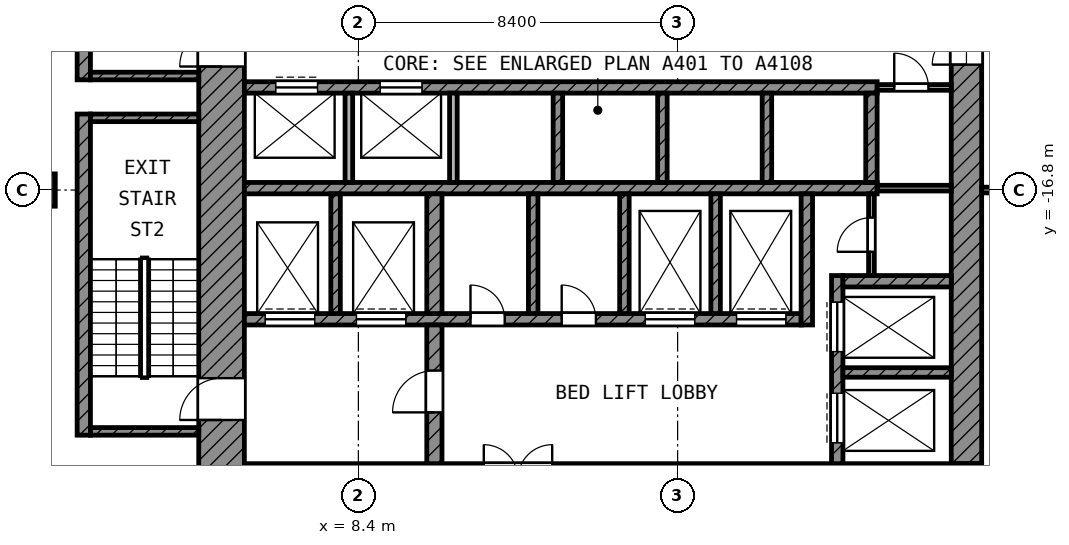
"""IFC4 building model, lengths in metres.
Left out: names, types, materials, properties, quantities, classifications, styles, units other than length and angle.
Written with IfcOpenShell. Run it as: python <this file> out.ifc"""

import sys

from ifc_helpers import new_model, si_unit, direction, frame, frame_2d, origin, origin_2d, place, context, subcontext, project, spatial, rectangle, extrude, element, fill, save


model = new_model("IFC4")
c1 = context("Model", 3, precision=1e-05, world=origin(), true_north=direction((0.0, 1.0)))
c2 = subcontext(c1, "Body", "Model", "MODEL_VIEW")
j1 = project(units=[si_unit("LENGTHUNIT", "METRE"), si_unit("PLANEANGLEUNIT", "RADIAN")], contexts=[c1])
p1 = place(None, origin())
s1 = spatial("IfcSite", under=j1, at=p1, CompositionType="ELEMENT")
p2 = place(p1, origin())
s2 = spatial("IfcBuilding", under=s1, at=p2, CompositionType="ELEMENT")
p3 = place(p2, frame((0.0, 0.0, 218.0)))
s3 = spatial("IfcBuildingStorey", under=s2, at=p3, CompositionType="ELEMENT", Elevation=218.0)
p4 = place(p3, frame((0.0, -16.8, 0.0), z_axis=(0.0, 0.0, 1.0), x_axis=(1.0, 0.0, 0.0)))
e1 = element("IfcColumn", 1, at=p4, inside=s3, PredefinedType="COLUMN", context=c2, shape_type="SweptSolid", body=[
    extrude(rectangle(XDim=0.85, YDim=0.85, at=origin_2d()), origin(), (0.0, 0.0, 1.0), 4.2),
])
p5 = place(p3, frame((4.8, -24.8, 0.0), z_axis=(0.0, 0.0, 1.0), x_axis=(0.0, 1.0, 0.0)))
e2 = element("IfcWall", 2, at=p5, inside=s3, PredefinedType="SHEAR", context=c2, shape_type="SweptSolid", body=[
    extrude(rectangle(XDim=19.4, YDim=1.2, at=frame_2d((9.7, 0.0))), origin(), (0.0, 0.0, 1.0), 3.6),
])
p6 = place(p5, frame((11.25, 0.0, 0.0)))
e3 = element("IfcOpeningElement", 3, at=p6, cuts=e2, PredefinedType="OPENING", context=c2, shape_type="SweptSolid", body=[
    extrude(rectangle(XDim=1.1, YDim=2.1, at=frame_2d((0.55, 1.05))), frame((0.0, 0.61, 0.0), z_axis=(0.0, -1.0, 0.0), x_axis=(1.0, 0.0, 0.0)), (0.0, 0.0, 1.0), 1.22),
])
p7 = place(p5, frame((1.95, 0.0, 0.0)))
e4 = element("IfcOpeningElement", 4, at=p7, cuts=e2, PredefinedType="OPENING", context=c2, shape_type="SweptSolid", body=[
    extrude(rectangle(XDim=1.1, YDim=2.1, at=frame_2d((0.55, 1.05))), frame((0.0, 0.61, 0.0), z_axis=(0.0, -1.0, 0.0), x_axis=(1.0, 0.0, 0.0)), (0.0, 0.0, 1.0), 1.22),
])
p8 = place(p3, frame((24.4, -24.0, 0.0), z_axis=(0.0, 0.0, 1.0), x_axis=(0.0, 1.0, 0.0)))
e5 = element("IfcWall", 5, at=p8, inside=s3, PredefinedType="SHEAR", context=c2, shape_type="SweptSolid", body=[
    extrude(rectangle(XDim=18.6, YDim=0.8, at=frame_2d((9.3, 0.0))), origin(), (0.0, 0.0, 1.0), 3.6),
])
p9 = place(p8, frame((10.5, 0.0, 0.0)))
e6 = element("IfcOpeningElement", 6, at=p9, cuts=e5, PredefinedType="OPENING", context=c2, shape_type="SweptSolid", body=[
    extrude(rectangle(XDim=1.8, YDim=2.1, at=frame_2d((0.9, 1.05))), frame((0.0, 0.41, 0.0), z_axis=(0.0, -1.0, 0.0), x_axis=(1.0, 0.0, 0.0)), (0.0, 0.0, 1.0), 0.82),
])
p10 = place(p3, frame((5.4, -24.4, 0.0), z_axis=(0.0, 0.0, 1.0), x_axis=(1.0, 0.0, 0.0)))
e7 = element("IfcWall", 7, at=p10, inside=s3, PredefinedType="SHEAR", context=c2, shape_type="SweptSolid", body=[
    extrude(rectangle(XDim=18.6, YDim=0.8, at=frame_2d((9.3, 0.0))), origin(), (0.0, 0.0, 1.0), 3.6),
])
p11 = place(p10, frame((6.3, 0.0, 0.0)))
e8 = element("IfcOpeningElement", 8, at=p11, cuts=e7, PredefinedType="OPENING", context=c2, shape_type="SweptSolid", body=[
    extrude(rectangle(XDim=1.8, YDim=2.1, at=frame_2d((0.9, 1.05))), frame((0.0, 0.41, 0.0), z_axis=(0.0, -1.0, 0.0), x_axis=(1.0, 0.0, 0.0)), (0.0, 0.0, 1.0), 0.82),
])
p12 = place(p3, frame((24.4, -24.8, 0.0), z_axis=(0.0, 0.0, 1.0), x_axis=(0.0, 1.0, 0.0)))
e9 = element("IfcWall", 9, at=p12, inside=s3, PredefinedType="SHEAR", context=c2, shape_type="SweptSolid", body=[
    extrude(rectangle(XDim=0.8, YDim=0.8, at=frame_2d((0.4, 0.0))), origin(), (0.0, 0.0, 1.0), 3.6),
])
p13 = place(p3, frame((5.4, -14.1, 0.0), z_axis=(0.0, 0.0, 1.0), x_axis=(1.0, 0.0, 0.0)))
e10 = element("IfcWall", 10, at=p13, inside=s3, PredefinedType="SHEAR", context=c2, shape_type="SweptSolid", body=[
    extrude(rectangle(XDim=16.65, YDim=0.3, at=frame_2d((8.325, 0.0))), origin(), (0.0, 0.0, 1.0), 3.6),
])
p14 = place(p13, frame((0.825, 0.0, 0.0)))
e11 = element("IfcOpeningElement", 11, at=p14, cuts=e10, PredefinedType="OPENING", context=c2, shape_type="SweptSolid", body=[
    extrude(rectangle(XDim=1.1, YDim=2.1, at=frame_2d((0.55, 1.05))), frame((0.0, 0.16, 0.0), z_axis=(0.0, -1.0, 0.0), x_axis=(1.0, 0.0, 0.0)), (0.0, 0.0, 1.0), 0.32),
])
p15 = place(p13, frame((3.575, 0.0, 0.0)))
e12 = element("IfcOpeningElement", 12, at=p15, cuts=e10, PredefinedType="OPENING", context=c2, shape_type="SweptSolid", body=[
    extrude(rectangle(XDim=1.1, YDim=2.1, at=frame_2d((0.55, 1.05))), frame((0.0, 0.16, 0.0), z_axis=(0.0, -1.0, 0.0), x_axis=(1.0, 0.0, 0.0)), (0.0, 0.0, 1.0), 0.32),
])
p16 = place(p3, frame((5.4, -16.75, 0.0), z_axis=(0.0, 0.0, 1.0), x_axis=(1.0, 0.0, 0.0)))
e13 = element("IfcWall", 13, at=p16, inside=s3, PredefinedType="SHEAR", context=c2, shape_type="SweptSolid", body=[
    extrude(rectangle(XDim=16.65, YDim=0.3, at=frame_2d((8.325, 0.0))), origin(), (0.0, 0.0, 1.0), 3.6),
])
p17 = place(p3, frame((5.4, -20.2, 0.0), z_axis=(0.0, 0.0, 1.0), x_axis=(1.0, 0.0, 0.0)))
e14 = element("IfcWall", 14, at=p17, inside=s3, PredefinedType="SHEAR", context=c2, shape_type="SweptSolid", body=[
    extrude(rectangle(XDim=14.65, YDim=0.3, at=frame_2d((7.325, 0.0))), origin(), (0.0, 0.0, 1.0), 3.6),
])
p18 = place(p17, frame((10.55, 0.0, 0.0)))
e15 = element("IfcOpeningElement", 15, at=p18, cuts=e14, PredefinedType="OPENING", context=c2, shape_type="SweptSolid", body=[
    extrude(rectangle(XDim=1.3, YDim=2.1, at=frame_2d((0.65, 1.05))), frame((0.0, 0.16, 0.0), z_axis=(0.0, -1.0, 0.0), x_axis=(1.0, 0.0, 0.0)), (0.0, 0.0, 1.0), 0.32),
])
p19 = place(p17, frame((12.95, 0.0, 0.0)))
e16 = element("IfcOpeningElement", 16, at=p19, cuts=e14, PredefinedType="OPENING", context=c2, shape_type="SweptSolid", body=[
    extrude(rectangle(XDim=1.3, YDim=2.1, at=frame_2d((0.65, 1.05))), frame((0.0, 0.16, 0.0), z_axis=(0.0, -1.0, 0.0), x_axis=(1.0, 0.0, 0.0)), (0.0, 0.0, 1.0), 0.32),
])
p20 = place(p17, frame((0.55, 0.0, 0.0)))
e17 = element("IfcOpeningElement", 17, at=p20, cuts=e14, PredefinedType="OPENING", context=c2, shape_type="SweptSolid", body=[
    extrude(rectangle(XDim=1.3, YDim=2.1, at=frame_2d((0.65, 1.05))), frame((0.0, 0.16, 0.0), z_axis=(0.0, -1.0, 0.0), x_axis=(1.0, 0.0, 0.0)), (0.0, 0.0, 1.0), 0.32),
])
p21 = place(p17, frame((2.95, 0.0, 0.0)))
e18 = element("IfcOpeningElement", 18, at=p21, cuts=e14, PredefinedType="OPENING", context=c2, shape_type="SweptSolid", body=[
    extrude(rectangle(XDim=1.3, YDim=2.1, at=frame_2d((0.65, 1.05))), frame((0.0, 0.16, 0.0), z_axis=(0.0, -1.0, 0.0), x_axis=(1.0, 0.0, 0.0)), (0.0, 0.0, 1.0), 0.32),
])
p22 = place(p17, frame((5.95, 0.0, 0.0)))
e19 = element("IfcOpeningElement", 19, at=p22, cuts=e14, PredefinedType="OPENING", context=c2, shape_type="SweptSolid", body=[
    extrude(rectangle(XDim=0.9, YDim=2.1, at=frame_2d((0.45, 1.05))), frame((0.0, 0.16, 0.0), z_axis=(0.0, -1.0, 0.0), x_axis=(1.0, 0.0, 0.0)), (0.0, 0.0, 1.0), 0.32),
])
p23 = place(p17, frame((8.35, 0.0, 0.0)))
e20 = element("IfcOpeningElement", 20, at=p23, cuts=e14, PredefinedType="OPENING", context=c2, shape_type="SweptSolid", body=[
    extrude(rectangle(XDim=0.9, YDim=2.1, at=frame_2d((0.45, 1.05))), frame((0.0, 0.16, 0.0), z_axis=(0.0, -1.0, 0.0), x_axis=(1.0, 0.0, 0.0)), (0.0, 0.0, 1.0), 0.32),
])
p24 = place(p3, frame((10.4, -24.0, 0.0), z_axis=(0.0, 0.0, 1.0), x_axis=(0.0, 1.0, 0.0)))
e21 = element("IfcWall", 21, at=p24, inside=s3, PredefinedType="SHEAR", context=c2, shape_type="SweptSolid", body=[
    extrude(rectangle(XDim=3.65, YDim=0.4, at=frame_2d((1.825, 0.0))), origin(), (0.0, 0.0, 1.0), 3.6),
])
p25 = place(p24, frame((1.35, 0.0, 0.0)))
e22 = element("IfcOpeningElement", 22, at=p25, cuts=e21, PredefinedType="OPENING", context=c2, shape_type="SweptSolid", body=[
    extrude(rectangle(XDim=1.1, YDim=2.1, at=frame_2d((0.55, 1.05))), frame((0.0, 0.21, 0.0), z_axis=(0.0, -1.0, 0.0), x_axis=(1.0, 0.0, 0.0)), (0.0, 0.0, 1.0), 0.42),
])
p26 = place(p3, frame((10.4, -20.05, 0.0), z_axis=(0.0, 0.0, 1.0), x_axis=(0.0, 1.0, 0.0)))
e23 = element("IfcWall", 23, at=p26, inside=s3, PredefinedType="SHEAR", context=c2, shape_type="SweptSolid", body=[
    extrude(rectangle(XDim=3.15, YDim=0.4, at=frame_2d((1.575, 0.0))), origin(), (0.0, 0.0, 1.0), 3.6),
])
p27 = place(p3, frame((20.2, -20.35, 0.0), z_axis=(0.0, 0.0, 1.0), x_axis=(0.0, 1.0, 0.0)))
e24 = element("IfcWall", 24, at=p27, inside=s3, PredefinedType="SHEAR", context=c2, shape_type="SweptSolid", body=[
    extrude(rectangle(XDim=3.45, YDim=0.3, at=frame_2d((1.725, 0.0))), origin(), (0.0, 0.0, 1.0), 3.6),
])
p28 = place(p3, frame((21.9, -16.6, 0.0), z_axis=(0.0, 0.0, 1.0), x_axis=(0.0, 1.0, 0.0)))
e25 = element("IfcWall", 25, at=p28, inside=s3, PredefinedType="SHEAR", context=c2, shape_type="SweptSolid", body=[
    extrude(rectangle(XDim=2.35, YDim=0.3, at=frame_2d((1.175, 0.0))), origin(), (0.0, 0.0, 1.0), 3.6),
])
p29 = place(p3, frame((21.15, -19.2, 0.0), z_axis=(0.0, 0.0, 1.0), x_axis=(1.0, 0.0, 0.0)))
e26 = element("IfcWall", 26, at=p29, inside=s3, PredefinedType="SHEAR", context=c2, shape_type="SweptSolid", body=[
    extrude(rectangle(XDim=2.85, YDim=0.3, at=frame_2d((1.425, 0.0))), origin(), (0.0, 0.0, 1.0), 3.6),
])
p30 = place(p3, frame((21.0, -24.0, 0.0), z_axis=(0.0, 0.0, 1.0), x_axis=(0.0, 1.0, 0.0)))
e27 = element("IfcWall", 27, at=p30, inside=s3, PredefinedType="SHEAR", context=c2, shape_type="SweptSolid", body=[
    extrude(rectangle(XDim=4.95, YDim=0.3, at=frame_2d((2.475, 0.0))), origin(), (0.0, 0.0, 1.0), 3.6),
])
p31 = place(p30, frame((2.95, 0.0, 0.0)))
e28 = element("IfcOpeningElement", 28, at=p31, cuts=e27, PredefinedType="OPENING", context=c2, shape_type="SweptSolid", body=[
    extrude(rectangle(XDim=1.3, YDim=2.1, at=frame_2d((0.65, 1.05))), frame((0.0, 0.16, 0.0), z_axis=(0.0, -1.0, 0.0), x_axis=(1.0, 0.0, 0.0)), (0.0, 0.0, 1.0), 0.32),
])
p32 = place(p30, frame((0.55, 0.0, 0.0)))
e29 = element("IfcOpeningElement", 29, at=p32, cuts=e27, PredefinedType="OPENING", context=c2, shape_type="SweptSolid", body=[
    extrude(rectangle(XDim=1.3, YDim=2.1, at=frame_2d((0.65, 1.05))), frame((0.0, 0.16, 0.0), z_axis=(0.0, -1.0, 0.0), x_axis=(1.0, 0.0, 0.0)), (0.0, 0.0, 1.0), 0.32),
])
p33 = place(p3, frame((21.15, -21.6, 0.0), z_axis=(0.0, 0.0, 1.0), x_axis=(1.0, 0.0, 0.0)))
e30 = element("IfcWall", 30, at=p33, inside=s3, PredefinedType="SHEAR", context=c2, shape_type="SweptSolid", body=[
    extrude(rectangle(XDim=2.85, YDim=0.25, at=frame_2d((1.425, 0.0))), origin(), (0.0, 0.0, 1.0), 3.6),
])
for number, where, z_axis, x_axis in (
    (31, (7.8, -20.05, 0.0), (0.0, 0.0, 1.0), (0.0, 1.0, 0.0)),
    (32, (13.0, -20.05, 0.0), (0.0, 0.0, 1.0), (0.0, 1.0, 0.0)),
    (33, (15.4, -20.05, 0.0), (0.0, 0.0, 1.0), (0.0, 1.0, 0.0)),
    (34, (17.8, -20.05, 0.0), (0.0, 0.0, 1.0), (0.0, 1.0, 0.0)),
):
    element("IfcWall", number, at=place(p3, frame(where, z_axis=z_axis, x_axis=x_axis)), inside=s3, PredefinedType="SHEAR", context=c2, shape_type="SweptSolid", body=[
        extrude(rectangle(XDim=3.15, YDim=0.25, at=frame_2d((1.575, 0.0))), origin(), (0.0, 0.0, 1.0), 3.6),
    ])
for number, where, z_axis, x_axis in (
    (35, (8.15, -16.6, 0.0), (0.0, 0.0, 1.0), (0.0, 1.0, 0.0)),
    (36, (10.9, -16.6, 0.0), (0.0, 0.0, 1.0), (0.0, 1.0, 0.0)),
):
    element("IfcWall", number, at=place(p3, frame(where, z_axis=z_axis, x_axis=x_axis)), inside=s3, PredefinedType="PARTITIONING", context=c2, shape_type="SweptSolid", body=[
        extrude(rectangle(XDim=2.35, YDim=0.2, at=frame_2d((1.175, 0.0))), origin(), (0.0, 0.0, 1.0), 3.6),
    ])
for number, where, z_axis, x_axis in (
    (37, (13.65, -16.6, 0.0), (0.0, 0.0, 1.0), (0.0, 1.0, 0.0)),
    (38, (16.4, -16.6, 0.0), (0.0, 0.0, 1.0), (0.0, 1.0, 0.0)),
    (39, (19.15, -16.6, 0.0), (0.0, 0.0, 1.0), (0.0, 1.0, 0.0)),
):
    element("IfcWall", number, at=place(p3, frame(where, z_axis=z_axis, x_axis=x_axis)), inside=s3, PredefinedType="SHEAR", context=c2, shape_type="SweptSolid", body=[
        extrude(rectangle(XDim=2.35, YDim=0.25, at=frame_2d((1.175, 0.0))), origin(), (0.0, 0.0, 1.0), 3.6),
    ])
p34 = place(p3, frame((21.9, -19.05, 0.0), z_axis=(0.0, 0.0, 1.0), x_axis=(0.0, 1.0, 0.0)))
e40 = element("IfcWall", 40, at=p34, inside=s3, PredefinedType="PARTITIONING", context=c2, shape_type="SweptSolid", body=[
    extrude(rectangle(XDim=2.15, YDim=0.15, at=frame_2d((1.075, 0.0))), origin(), (0.0, 0.0, 1.0), 3.6),
])
p35 = place(p34, frame((0.625, 0.0, 0.0)))
e41 = element("IfcOpeningElement", 41, at=p35, cuts=e40, PredefinedType="OPENING", context=c2, shape_type="SweptSolid", body=[
    extrude(rectangle(XDim=0.9, YDim=2.1, at=frame_2d((0.45, 1.05))), frame((0.0, 0.085, 0.0), z_axis=(0.0, -1.0, 0.0), x_axis=(1.0, 0.0, 0.0)), (0.0, 0.0, 1.0), 0.17),
])
p36 = place(p3, frame((22.05, -16.75, 0.0), z_axis=(0.0, 0.0, 1.0), x_axis=(1.0, 0.0, 0.0)))
e42 = element("IfcWall", 42, at=p36, inside=s3, PredefinedType="PARTITIONING", context=c2, shape_type="SweptSolid", body=[
    extrude(rectangle(XDim=1.95, YDim=0.15, at=frame_2d((0.975, 0.0))), origin(), (0.0, 0.0, 1.0), 3.6),
])
p37 = place(p3, frame((22.05, -14.1, 0.0), z_axis=(0.0, 0.0, 1.0), x_axis=(1.0, 0.0, 0.0)))
e43 = element("IfcWall", 43, at=p37, inside=s3, PredefinedType="PARTITIONING", context=c2, shape_type="SweptSolid", body=[
    extrude(rectangle(XDim=1.95, YDim=0.15, at=frame_2d((0.975, 0.0))), origin(), (0.0, 0.0, 1.0), 3.6),
])
p38 = place(p37, frame((0.45, 0.0, 0.0)))
e44 = element("IfcOpeningElement", 44, at=p38, cuts=e43, PredefinedType="OPENING", context=c2, shape_type="SweptSolid", body=[
    extrude(rectangle(XDim=0.9, YDim=2.1, at=frame_2d((0.45, 1.05))), frame((0.0, 0.085, 0.0), z_axis=(0.0, -1.0, 0.0), x_axis=(1.0, 0.0, 0.0)), (0.0, 0.0, 1.0), 0.17),
])
p39 = place(p3, frame((1.175, -13.9, 0.0), z_axis=(0.0, 0.0, 1.0), x_axis=(0.0, 1.0, 0.0)))
e45 = element("IfcWall", 45, at=p39, inside=s3, PredefinedType="SHEAR", context=c2, shape_type="SweptSolid", body=[
    extrude(rectangle(XDim=8.45, YDim=0.35, at=frame_2d((4.225, 0.0))), origin(), (0.0, 0.0, 1.0), 3.6),
])
p40 = place(p3, frame((1.35, -13.8, 0.0), z_axis=(0.0, 0.0, 1.0), x_axis=(1.0, 0.0, 0.0)))
e46 = element("IfcWall", 46, at=p40, inside=s3, PredefinedType="SHEAR", context=c2, shape_type="SweptSolid", body=[
    extrude(rectangle(XDim=2.85, YDim=0.2, at=frame_2d((1.425, 0.0))), origin(), (0.0, 0.0, 1.0), 3.6),
])
p41 = place(p3, frame((1.175, -23.25, 0.0), z_axis=(0.0, 0.0, 1.0), x_axis=(0.0, 1.0, 0.0)))
e47 = element("IfcWall", 47, at=p41, inside=s3, PredefinedType="SHEAR", context=c2, shape_type="SweptSolid", body=[
    extrude(rectangle(XDim=8.45, YDim=0.35, at=frame_2d((4.225, 0.0))), origin(), (0.0, 0.0, 1.0), 3.6),
])
for number, where, z_axis, x_axis in (
    (48, (1.35, -14.9, 0.0), (0.0, 0.0, 1.0), (1.0, 0.0, 0.0)),
    (49, (1.35, -23.15, 0.0), (0.0, 0.0, 1.0), (1.0, 0.0, 0.0)),
):
    element("IfcWall", number, at=place(p3, frame(where, z_axis=z_axis, x_axis=x_axis)), inside=s3, PredefinedType="SHEAR", context=c2, shape_type="SweptSolid", body=[
        extrude(rectangle(XDim=2.85, YDim=0.2, at=frame_2d((1.425, 0.0))), origin(), (0.0, 0.0, 1.0), 3.6),
    ])
p42 = place(p3, frame((24.8, -16.8, 0.0), z_axis=(0.0, 0.0, 1.0), x_axis=(1.0, 0.0, 0.0)))
e50 = element("IfcWall", 50, at=p42, inside=s3, PredefinedType="PARTITIONING", context=c2, shape_type="SweptSolid", body=[
    extrude(rectangle(XDim=8.72, YDim=0.15, at=frame_2d((4.36, 0.0))), origin(), (0.0, 0.0, 1.0), 3.6),
])
p43 = place(p42, frame((1.75, 0.0, 0.0)))
e51 = element("IfcOpeningElement", 51, at=p43, cuts=e50, PredefinedType="OPENING", context=c2, shape_type="SweptSolid", body=[
    extrude(rectangle(XDim=1.5, YDim=2.1, at=frame_2d((0.75, 1.05))), frame((0.0, 0.085, 0.0), z_axis=(0.0, -1.0, 0.0), x_axis=(1.0, 0.0, 0.0)), (0.0, 0.0, 1.0), 0.17),
])
p44 = place(p42, frame((6.1, 0.0, 0.0)))
e52 = element("IfcOpeningElement", 52, at=p44, cuts=e50, PredefinedType="OPENING", context=c2, shape_type="SweptSolid", body=[
    extrude(rectangle(XDim=1.2, YDim=2.1, at=frame_2d((0.6, 1.05))), frame((0.0, 0.085, 0.0), z_axis=(0.0, -1.0, 0.0), x_axis=(1.0, 0.0, 0.0)), (0.0, 0.0, 1.0), 0.17),
])
p45 = place(p14, origin())
e53 = element("IfcDoor", 53, at=p45, inside=s3, OperationType="DOUBLE_DOOR_SLIDING", PredefinedType="DOOR", context=c2, shape_type="SweptSolid", body=[
    extrude(rectangle(XDim=1.1, YDim=2.1, at=frame_2d((0.55, 1.05))), frame((0.0, 0.025, 0.0), z_axis=(0.0, -1.0, 0.0), x_axis=(1.0, 0.0, 0.0)), (0.0, 0.0, 1.0), 0.05),
])
fill(e11, e53)
p46 = place(p15, origin())
e54 = element("IfcDoor", 54, at=p46, inside=s3, OperationType="DOUBLE_DOOR_SLIDING", PredefinedType="DOOR", context=c2, shape_type="SweptSolid", body=[
    extrude(rectangle(XDim=1.1, YDim=2.1, at=frame_2d((0.55, 1.05))), frame((0.0, 0.025, 0.0), z_axis=(0.0, -1.0, 0.0), x_axis=(1.0, 0.0, 0.0)), (0.0, 0.0, 1.0), 0.05),
])
fill(e12, e54)
p47 = place(p31, origin())
e55 = element("IfcDoor", 55, at=p47, inside=s3, OperationType="DOUBLE_DOOR_SLIDING", PredefinedType="DOOR", context=c2, shape_type="SweptSolid", body=[
    extrude(rectangle(XDim=1.3, YDim=2.1, at=frame_2d((0.65, 1.05))), frame((0.0, 0.025, 0.0), z_axis=(0.0, -1.0, 0.0), x_axis=(1.0, 0.0, 0.0)), (0.0, 0.0, 1.0), 0.05),
])
fill(e28, e55)
p48 = place(p32, origin())
e56 = element("IfcDoor", 56, at=p48, inside=s3, OperationType="DOUBLE_DOOR_SLIDING", PredefinedType="DOOR", context=c2, shape_type="SweptSolid", body=[
    extrude(rectangle(XDim=1.3, YDim=2.1, at=frame_2d((0.65, 1.05))), frame((0.0, 0.025, 0.0), z_axis=(0.0, -1.0, 0.0), x_axis=(1.0, 0.0, 0.0)), (0.0, 0.0, 1.0), 0.05),
])
fill(e29, e56)
p49 = place(p18, origin())
e57 = element("IfcDoor", 57, at=p49, inside=s3, OperationType="DOUBLE_DOOR_SLIDING", PredefinedType="DOOR", context=c2, shape_type="SweptSolid", body=[
    extrude(rectangle(XDim=1.3, YDim=2.1, at=frame_2d((0.65, 1.05))), frame((0.0, 0.025, 0.0), z_axis=(0.0, -1.0, 0.0), x_axis=(1.0, 0.0, 0.0)), (0.0, 0.0, 1.0), 0.05),
])
fill(e15, e57)
p50 = place(p19, origin())
e58 = element("IfcDoor", 58, at=p50, inside=s3, OperationType="DOUBLE_DOOR_SLIDING", PredefinedType="DOOR", context=c2, shape_type="SweptSolid", body=[
    extrude(rectangle(XDim=1.3, YDim=2.1, at=frame_2d((0.65, 1.05))), frame((0.0, 0.025, 0.0), z_axis=(0.0, -1.0, 0.0), x_axis=(1.0, 0.0, 0.0)), (0.0, 0.0, 1.0), 0.05),
])
fill(e16, e58)
p51 = place(p20, origin())
e59 = element("IfcDoor", 59, at=p51, inside=s3, OperationType="DOUBLE_DOOR_SLIDING", PredefinedType="DOOR", context=c2, shape_type="SweptSolid", body=[
    extrude(rectangle(XDim=1.3, YDim=2.1, at=frame_2d((0.65, 1.05))), frame((0.0, 0.025, 0.0), z_axis=(0.0, -1.0, 0.0), x_axis=(1.0, 0.0, 0.0)), (0.0, 0.0, 1.0), 0.05),
])
fill(e17, e59)
p52 = place(p21, origin())
e60 = element("IfcDoor", 60, at=p52, inside=s3, OperationType="DOUBLE_DOOR_SLIDING", PredefinedType="DOOR", context=c2, shape_type="SweptSolid", body=[
    extrude(rectangle(XDim=1.3, YDim=2.1, at=frame_2d((0.65, 1.05))), frame((0.0, 0.025, 0.0), z_axis=(0.0, -1.0, 0.0), x_axis=(1.0, 0.0, 0.0)), (0.0, 0.0, 1.0), 0.05),
])
fill(e18, e60)
p53 = place(p6, origin())
e61 = element("IfcDoor", 61, at=p53, inside=s3, OperationType="SINGLE_SWING_LEFT", PredefinedType="DOOR", context=c2, shape_type="SweptSolid", body=[
    extrude(rectangle(XDim=1.1, YDim=2.1, at=frame_2d((0.55, 1.05))), frame((0.0, 0.025, 0.0), z_axis=(0.0, -1.0, 0.0), x_axis=(1.0, 0.0, 0.0)), (0.0, 0.0, 1.0), 0.05),
])
fill(e3, e61)
p54 = place(p7, origin())
e62 = element("IfcDoor", 62, at=p54, inside=s3, OperationType="SINGLE_SWING_LEFT", PredefinedType="DOOR", context=c2, shape_type="SweptSolid", body=[
    extrude(rectangle(XDim=1.1, YDim=2.1, at=frame_2d((0.55, 1.05))), frame((0.0, 0.025, 0.0), z_axis=(0.0, -1.0, 0.0), x_axis=(1.0, 0.0, 0.0)), (0.0, 0.0, 1.0), 0.05),
])
fill(e4, e62)
p55 = place(p25, origin())
e63 = element("IfcDoor", 63, at=p55, inside=s3, OperationType="SINGLE_SWING_LEFT", PredefinedType="DOOR", context=c2, shape_type="SweptSolid", body=[
    extrude(rectangle(XDim=1.1, YDim=2.1, at=frame_2d((0.55, 1.05))), frame((0.0, 0.025, 0.0), z_axis=(0.0, -1.0, 0.0), x_axis=(1.0, 0.0, 0.0)), (0.0, 0.0, 1.0), 0.05),
])
fill(e22, e63)
p56 = place(p9, origin())
e64 = element("IfcDoor", 64, at=p56, inside=s3, OperationType="DOUBLE_DOOR_SINGLE_SWING", PredefinedType="DOOR", context=c2, shape_type="SweptSolid", body=[
    extrude(rectangle(XDim=1.8, YDim=2.1, at=frame_2d((0.9, 1.05))), frame((0.0, 0.025, 0.0), z_axis=(0.0, -1.0, 0.0), x_axis=(1.0, 0.0, 0.0)), (0.0, 0.0, 1.0), 0.05),
])
fill(e6, e64)
p57 = place(p38, origin())
e65 = element("IfcDoor", 65, at=p57, inside=s3, OperationType="SINGLE_SWING_LEFT", PredefinedType="DOOR", context=c2, shape_type="SweptSolid", body=[
    extrude(rectangle(XDim=0.9, YDim=2.1, at=frame_2d((0.45, 1.05))), frame((0.0, 0.025, 0.0), z_axis=(0.0, -1.0, 0.0), x_axis=(1.0, 0.0, 0.0)), (0.0, 0.0, 1.0), 0.05),
])
fill(e44, e65)
p58 = place(p35, origin())
e66 = element("IfcDoor", 66, at=p58, inside=s3, OperationType="SINGLE_SWING_LEFT", PredefinedType="DOOR", context=c2, shape_type="SweptSolid", body=[
    extrude(rectangle(XDim=0.9, YDim=2.1, at=frame_2d((0.45, 1.05))), frame((0.0, 0.025, 0.0), z_axis=(0.0, -1.0, 0.0), x_axis=(1.0, 0.0, 0.0)), (0.0, 0.0, 1.0), 0.05),
])
fill(e41, e66)
p59 = place(p22, origin())
e67 = element("IfcDoor", 67, at=p59, inside=s3, OperationType="SINGLE_SWING_LEFT", PredefinedType="DOOR", context=c2, shape_type="SweptSolid", body=[
    extrude(rectangle(XDim=0.9, YDim=2.1, at=frame_2d((0.45, 1.05))), frame((0.0, 0.025, 0.0), z_axis=(0.0, -1.0, 0.0), x_axis=(1.0, 0.0, 0.0)), (0.0, 0.0, 1.0), 0.05),
])
fill(e19, e67)
p60 = place(p23, origin())
e68 = element("IfcDoor", 68, at=p60, inside=s3, OperationType="SINGLE_SWING_LEFT", PredefinedType="DOOR", context=c2, shape_type="SweptSolid", body=[
    extrude(rectangle(XDim=0.9, YDim=2.1, at=frame_2d((0.45, 1.05))), frame((0.0, 0.025, 0.0), z_axis=(0.0, -1.0, 0.0), x_axis=(1.0, 0.0, 0.0)), (0.0, 0.0, 1.0), 0.05),
])
fill(e20, e68)
save(model, sys.argv[1])
